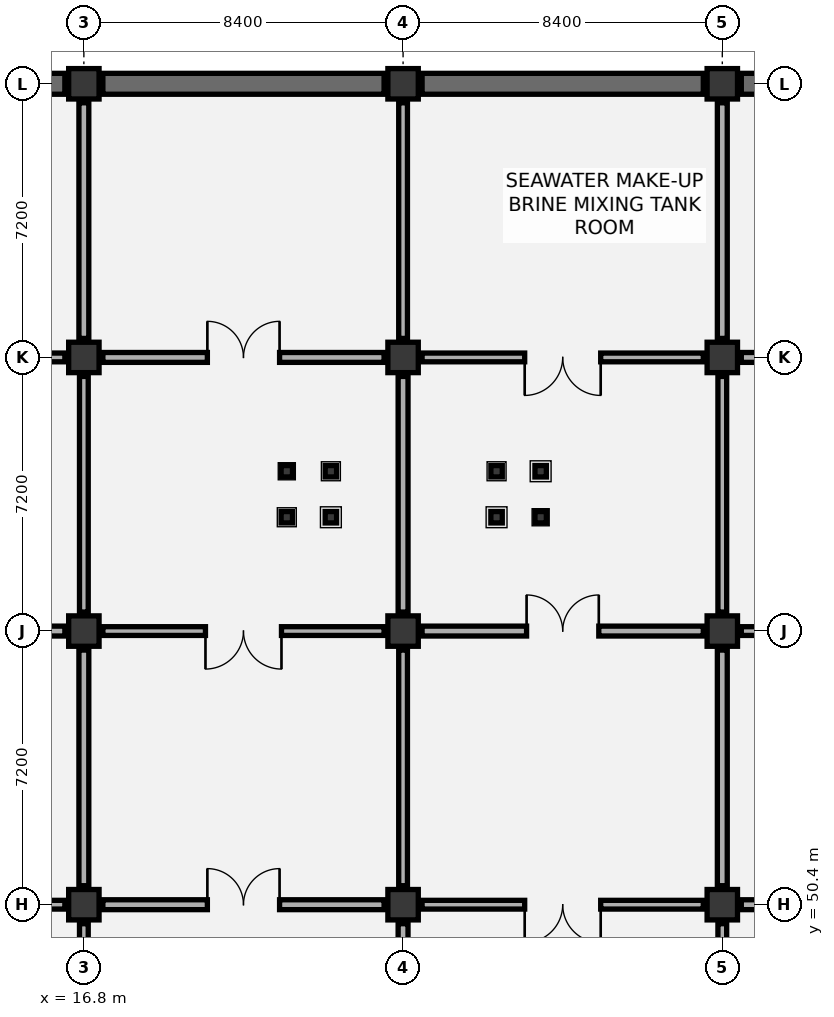
"""IFC4 building model, lengths in metres.
Left out: names, types, materials, properties, quantities, classifications, styles, units other than length and angle.
Written with IfcOpenShell. Run it as: python <this file> out.ifc"""

import sys

from ifc_helpers import new_model, si_unit, direction, frame, frame_2d, origin, origin_2d, place, context, subcontext, project, spatial, rectangle, i_section, extrude, element, fill, save


model = new_model("IFC4")
c1 = context("Model", 3, precision=1e-05, world=origin(), true_north=direction((0.0, 1.0)))
c2 = subcontext(c1, "Body", "Model", "MODEL_VIEW")
j1 = project(units=[si_unit("LENGTHUNIT", "METRE"), si_unit("PLANEANGLEUNIT", "RADIAN")], contexts=[c1])
p1 = place(None, origin())
s1 = spatial("IfcSite", under=j1, at=p1, CompositionType="ELEMENT")
p2 = place(p1, origin())
s2 = spatial("IfcBuilding", under=s1, at=p2, CompositionType="ELEMENT")
p3 = place(p2, frame((0.0, 0.0, -9.6)))
s3 = spatial("IfcBuildingStorey", under=s2, at=p3, CompositionType="ELEMENT", Elevation=-9.6)
for number, where, z_axis, x_axis in (
    (1, (16.8, 50.4, 0.0), (0.0, 0.0, 1.0), (1.0, 0.0, 0.0)),
    (2, (16.8, 57.6, 0.0), (0.0, 0.0, 1.0), (1.0, 0.0, 0.0)),
    (3, (16.8, 64.8, 0.0), (0.0, 0.0, 1.0), (1.0, 0.0, 0.0)),
    (4, (16.8, 72.0, 0.0), (0.0, 0.0, 1.0), (1.0, 0.0, 0.0)),
    (5, (25.2, 50.4, 0.0), (0.0, 0.0, 1.0), (1.0, 0.0, 0.0)),
    (6, (25.2, 57.6, 0.0), (0.0, 0.0, 1.0), (1.0, 0.0, 0.0)),
    (7, (25.2, 64.8, 0.0), (0.0, 0.0, 1.0), (1.0, 0.0, 0.0)),
    (8, (25.2, 72.0, 0.0), (0.0, 0.0, 1.0), (1.0, 0.0, 0.0)),
    (9, (33.6, 50.4, 0.0), (0.0, 0.0, 1.0), (1.0, 0.0, 0.0)),
    (10, (33.6, 57.6, 0.0), (0.0, 0.0, 1.0), (1.0, 0.0, 0.0)),
    (11, (33.6, 64.8, 0.0), (0.0, 0.0, 1.0), (1.0, 0.0, 0.0)),
    (12, (33.6, 72.0, 0.0), (0.0, 0.0, 1.0), (1.0, 0.0, 0.0)),
):
    element("IfcColumn", number, at=place(p3, frame(where, z_axis=z_axis, x_axis=x_axis)), inside=s3, PredefinedType="COLUMN", context=c2, shape_type="SweptSolid", body=[
        extrude(rectangle(XDim=0.8, YDim=0.8, at=origin_2d()), origin(), (0.0, 0.0, 1.0), 4.8),
    ])
for number, where, z_axis, x_axis in (
    (13, (22.14, 60.595, 0.0), (0.0, 0.0, 1.0), (1.0, 0.0, 0.0)),
    (14, (23.3, 60.595, 0.0), (0.0, 0.0, 1.0), (1.0, 0.0, 0.0)),
    (15, (22.14, 61.805, 0.0), (0.0, 0.0, 1.0), (1.0, 0.0, 0.0)),
    (16, (23.3, 61.805, 0.0), (0.0, 0.0, 1.0), (1.0, 0.0, 0.0)),
    (17, (27.66, 60.595, 0.0), (0.0, 0.0, 1.0), (1.0, 0.0, 0.0)),
    (18, (28.82, 60.595, 0.0), (0.0, 0.0, 1.0), (1.0, 0.0, 0.0)),
    (19, (27.66, 61.805, 0.0), (0.0, 0.0, 1.0), (1.0, 0.0, 0.0)),
    (20, (28.82, 61.805, 0.0), (0.0, 0.0, 1.0), (1.0, 0.0, 0.0)),
):
    element("IfcColumn", number, at=place(p3, frame(where, z_axis=z_axis, x_axis=x_axis)), inside=s3, PredefinedType="COLUMN", context=c2, shape_type="SweptSolid", body=[
        extrude(i_section(OverallWidth=0.3, OverallDepth=0.3, WebThickness=0.011, FlangeThickness=0.019, FilletRadius=0.027, at=origin_2d()), origin(), (0.0, 0.0, 1.0), 4.4),
    ])
p4 = place(p3, frame((8.9, 72.0, 0.0), z_axis=(0.0, 0.0, 1.0), x_axis=(1.0, 0.0, 0.0)))
e21 = element("IfcWall", 21, at=p4, inside=s3, PredefinedType="USERDEFINED", context=c2, shape_type="SweptSolid", body=[
    extrude(rectangle(XDim=7.4, YDim=0.55, at=frame_2d((3.7, 0.0))), origin(), (0.0, 0.0, 1.0), 4.4),
])
p5 = place(p3, frame((17.3, 72.0, 0.0), z_axis=(0.0, 0.0, 1.0), x_axis=(1.0, 0.0, 0.0)))
e22 = element("IfcWall", 22, at=p5, inside=s3, PredefinedType="USERDEFINED", context=c2, shape_type="SweptSolid", body=[
    extrude(rectangle(XDim=7.4, YDim=0.55, at=frame_2d((3.7, 0.0))), origin(), (0.0, 0.0, 1.0), 4.4),
])
p6 = place(p3, frame((25.7, 72.0, 0.0), z_axis=(0.0, 0.0, 1.0), x_axis=(1.0, 0.0, 0.0)))
e23 = element("IfcWall", 23, at=p6, inside=s3, PredefinedType="USERDEFINED", context=c2, shape_type="SweptSolid", body=[
    extrude(rectangle(XDim=7.4, YDim=0.55, at=frame_2d((3.7, 0.0))), origin(), (0.0, 0.0, 1.0), 4.4),
])
p7 = place(p3, frame((34.1, 72.0, 0.0), z_axis=(0.0, 0.0, 1.0), x_axis=(1.0, 0.0, 0.0)))
e24 = element("IfcWall", 24, at=p7, inside=s3, PredefinedType="USERDEFINED", context=c2, shape_type="SweptSolid", body=[
    extrude(rectangle(XDim=7.4, YDim=0.55, at=frame_2d((3.7, 0.0))), origin(), (0.0, 0.0, 1.0), 4.4),
])
p8 = place(p3, frame((16.8, 43.7, 0.0), z_axis=(0.0, 0.0, 1.0), x_axis=(0.0, 1.0, 0.0)))
e25 = element("IfcWall", 25, at=p8, inside=s3, PredefinedType="PARTITIONING", context=c2, shape_type="SweptSolid", body=[
    extrude(rectangle(XDim=6.2, YDim=0.23, at=frame_2d((3.1, 0.0))), origin(), (0.0, 0.0, 1.0), 3.595),
])
p9 = place(p8, frame((2.15, 0.0, 0.0)))
e26 = element("IfcOpeningElement", 26, at=p9, cuts=e25, PredefinedType="OPENING", context=c2, shape_type="SweptSolid", body=[
    extrude(rectangle(XDim=1.9, YDim=2.3, at=frame_2d((0.95, 1.15))), frame((0.0, 0.125, 0.0), z_axis=(0.0, -1.0, 0.0), x_axis=(1.0, 0.0, 0.0)), (0.0, 0.0, 1.0), 0.25),
])
p10 = place(p3, frame((8.9, 50.4, 0.0), z_axis=(0.0, 0.0, 1.0), x_axis=(1.0, 0.0, 0.0)))
e27 = element("IfcWall", 27, at=p10, inside=s3, PredefinedType="PARTITIONING", context=c2, shape_type="SweptSolid", body=[
    extrude(rectangle(XDim=7.4, YDim=0.23, at=frame_2d((3.7, 0.0))), origin(), (0.0, 0.0, 1.0), 3.495),
])
p11 = place(p10, frame((2.7, 0.0, 0.0)))
e28 = element("IfcOpeningElement", 28, at=p11, cuts=e27, PredefinedType="OPENING", context=c2, shape_type="SweptSolid", body=[
    extrude(rectangle(XDim=2.0, YDim=2.35, at=frame_2d((1.0, 1.175))), frame((0.0, 0.125, 0.0), z_axis=(0.0, -1.0, 0.0), x_axis=(1.0, 0.0, 0.0)), (0.0, 0.0, 1.0), 0.25),
])
p12 = place(p3, frame((16.8, 50.9, 0.0), z_axis=(0.0, 0.0, 1.0), x_axis=(0.0, 1.0, 0.0)))
e29 = element("IfcWall", 29, at=p12, inside=s3, PredefinedType="PARTITIONING", context=c2, shape_type="SweptSolid", body=[
    extrude(rectangle(XDim=6.2, YDim=0.26, at=frame_2d((3.1, 0.0))), origin(), (0.0, 0.0, 1.0), 3.595),
])
p13 = place(p3, frame((8.9, 57.6, 0.0), z_axis=(0.0, 0.0, 1.0), x_axis=(1.0, 0.0, 0.0)))
e30 = element("IfcWall", 30, at=p13, inside=s3, PredefinedType="PARTITIONING", context=c2, shape_type="SweptSolid", body=[
    extrude(rectangle(XDim=7.4, YDim=0.26, at=frame_2d((3.7, 0.0))), origin(), (0.0, 0.0, 1.0), 3.495),
])
p14 = place(p13, frame((2.75, 0.0, 0.0)))
e31 = element("IfcOpeningElement", 31, at=p14, cuts=e30, PredefinedType="OPENING", context=c2, shape_type="SweptSolid", body=[
    extrude(rectangle(XDim=1.9, YDim=2.3, at=frame_2d((0.95, 1.15))), frame((0.0, 0.14, 0.0), z_axis=(0.0, -1.0, 0.0), x_axis=(1.0, 0.0, 0.0)), (0.0, 0.0, 1.0), 0.28),
])
p15 = place(p3, frame((16.8, 58.1, 0.0), z_axis=(0.0, 0.0, 1.0), x_axis=(0.0, 1.0, 0.0)))
e32 = element("IfcWall", 32, at=p15, inside=s3, PredefinedType="PARTITIONING", context=c2, shape_type="SweptSolid", body=[
    extrude(rectangle(XDim=6.2, YDim=0.23, at=frame_2d((3.1, 0.0))), origin(), (0.0, 0.0, 1.0), 3.595),
])
p16 = place(p3, frame((8.9, 64.8, 0.0), z_axis=(0.0, 0.0, 1.0), x_axis=(1.0, 0.0, 0.0)))
e33 = element("IfcWall", 33, at=p16, inside=s3, PredefinedType="PARTITIONING", context=c2, shape_type="SweptSolid", body=[
    extrude(rectangle(XDim=7.4, YDim=0.23, at=frame_2d((3.7, 0.0))), origin(), (0.0, 0.0, 1.0), 3.495),
])
p17 = place(p16, frame((2.7, 0.0, 0.0)))
e34 = element("IfcOpeningElement", 34, at=p17, cuts=e33, PredefinedType="OPENING", context=c2, shape_type="SweptSolid", body=[
    extrude(rectangle(XDim=2.0, YDim=2.35, at=frame_2d((1.0, 1.175))), frame((0.0, 0.125, 0.0), z_axis=(0.0, -1.0, 0.0), x_axis=(1.0, 0.0, 0.0)), (0.0, 0.0, 1.0), 0.25),
])
p18 = place(p3, frame((16.8, 65.3, 0.0), z_axis=(0.0, 0.0, 1.0), x_axis=(0.0, 1.0, 0.0)))
e35 = element("IfcWall", 35, at=p18, inside=s3, PredefinedType="PARTITIONING", context=c2, shape_type="SweptSolid", body=[
    extrude(rectangle(XDim=6.2, YDim=0.26, at=frame_2d((3.1, 0.0))), origin(), (0.0, 0.0, 1.0), 3.595),
])
p19 = place(p3, frame((25.2, 43.7, 0.0), z_axis=(0.0, 0.0, 1.0), x_axis=(0.0, 1.0, 0.0)))
e36 = element("IfcWall", 36, at=p19, inside=s3, PredefinedType="PARTITIONING", context=c2, shape_type="SweptSolid", body=[
    extrude(rectangle(XDim=6.2, YDim=0.26, at=frame_2d((3.1, 0.0))), origin(), (0.0, 0.0, 1.0), 3.595),
])
p20 = place(p19, frame((2.1, 0.0, 0.0)))
e37 = element("IfcOpeningElement", 37, at=p20, cuts=e36, PredefinedType="OPENING", context=c2, shape_type="SweptSolid", body=[
    extrude(rectangle(XDim=2.0, YDim=2.35, at=frame_2d((1.0, 1.175))), frame((0.0, 0.14, 0.0), z_axis=(0.0, -1.0, 0.0), x_axis=(1.0, 0.0, 0.0)), (0.0, 0.0, 1.0), 0.28),
])
p21 = place(p3, frame((17.3, 50.4, 0.0), z_axis=(0.0, 0.0, 1.0), x_axis=(1.0, 0.0, 0.0)))
e38 = element("IfcWall", 38, at=p21, inside=s3, PredefinedType="PARTITIONING", context=c2, shape_type="SweptSolid", body=[
    extrude(rectangle(XDim=7.4, YDim=0.26, at=frame_2d((3.7, 0.0))), origin(), (0.0, 0.0, 1.0), 3.495),
])
p22 = place(p21, frame((2.75, 0.0, 0.0)))
e39 = element("IfcOpeningElement", 39, at=p22, cuts=e38, PredefinedType="OPENING", context=c2, shape_type="SweptSolid", body=[
    extrude(rectangle(XDim=1.9, YDim=2.3, at=frame_2d((0.95, 1.15))), frame((0.0, 0.14, 0.0), z_axis=(0.0, -1.0, 0.0), x_axis=(1.0, 0.0, 0.0)), (0.0, 0.0, 1.0), 0.28),
])
p23 = place(p3, frame((25.2, 50.9, 0.0), z_axis=(0.0, 0.0, 1.0), x_axis=(0.0, 1.0, 0.0)))
e40 = element("IfcWall", 40, at=p23, inside=s3, PredefinedType="PARTITIONING", context=c2, shape_type="SweptSolid", body=[
    extrude(rectangle(XDim=6.2, YDim=0.23, at=frame_2d((3.1, 0.0))), origin(), (0.0, 0.0, 1.0), 3.595),
])
p24 = place(p3, frame((17.3, 57.6, 0.0), z_axis=(0.0, 0.0, 1.0), x_axis=(1.0, 0.0, 0.0)))
e41 = element("IfcWall", 41, at=p24, inside=s3, PredefinedType="PARTITIONING", context=c2, shape_type="SweptSolid", body=[
    extrude(rectangle(XDim=7.4, YDim=0.23, at=frame_2d((3.7, 0.0))), origin(), (0.0, 0.0, 1.0), 3.495),
])
p25 = place(p24, frame((2.7, 0.0, 0.0)))
e42 = element("IfcOpeningElement", 42, at=p25, cuts=e41, PredefinedType="OPENING", context=c2, shape_type="SweptSolid", body=[
    extrude(rectangle(XDim=2.0, YDim=2.35, at=frame_2d((1.0, 1.175))), frame((0.0, 0.125, 0.0), z_axis=(0.0, -1.0, 0.0), x_axis=(1.0, 0.0, 0.0)), (0.0, 0.0, 1.0), 0.25),
])
p26 = place(p3, frame((25.2, 58.1, 0.0), z_axis=(0.0, 0.0, 1.0), x_axis=(0.0, 1.0, 0.0)))
e43 = element("IfcWall", 43, at=p26, inside=s3, PredefinedType="PARTITIONING", context=c2, shape_type="SweptSolid", body=[
    extrude(rectangle(XDim=6.2, YDim=0.26, at=frame_2d((3.1, 0.0))), origin(), (0.0, 0.0, 1.0), 3.595),
])
p27 = place(p3, frame((17.3, 64.8, 0.0), z_axis=(0.0, 0.0, 1.0), x_axis=(1.0, 0.0, 0.0)))
e44 = element("IfcWall", 44, at=p27, inside=s3, PredefinedType="PARTITIONING", context=c2, shape_type="SweptSolid", body=[
    extrude(rectangle(XDim=7.4, YDim=0.26, at=frame_2d((3.7, 0.0))), origin(), (0.0, 0.0, 1.0), 3.495),
])
p28 = place(p27, frame((2.75, 0.0, 0.0)))
e45 = element("IfcOpeningElement", 45, at=p28, cuts=e44, PredefinedType="OPENING", context=c2, shape_type="SweptSolid", body=[
    extrude(rectangle(XDim=1.9, YDim=2.3, at=frame_2d((0.95, 1.15))), frame((0.0, 0.14, 0.0), z_axis=(0.0, -1.0, 0.0), x_axis=(1.0, 0.0, 0.0)), (0.0, 0.0, 1.0), 0.28),
])
for number, where, z_axis, x_axis in (
    (46, (25.2, 65.3, 0.0), (0.0, 0.0, 1.0), (0.0, 1.0, 0.0)),
    (47, (33.6, 43.7, 0.0), (0.0, 0.0, 1.0), (0.0, 1.0, 0.0)),
):
    element("IfcWall", number, at=place(p3, frame(where, z_axis=z_axis, x_axis=x_axis)), inside=s3, PredefinedType="PARTITIONING", context=c2, shape_type="SweptSolid", body=[
        extrude(rectangle(XDim=6.2, YDim=0.23, at=frame_2d((3.1, 0.0))), origin(), (0.0, 0.0, 1.0), 3.595),
    ])
p29 = place(p3, frame((25.7, 50.4, 0.0), z_axis=(0.0, 0.0, 1.0), x_axis=(1.0, 0.0, 0.0)))
e48 = element("IfcWall", 48, at=p29, inside=s3, PredefinedType="PARTITIONING", context=c2, shape_type="SweptSolid", body=[
    extrude(rectangle(XDim=7.4, YDim=0.23, at=frame_2d((3.7, 0.0))), origin(), (0.0, 0.0, 1.0), 3.495),
])
p30 = place(p29, frame((2.7, 0.0, 0.0)))
e49 = element("IfcOpeningElement", 49, at=p30, cuts=e48, PredefinedType="OPENING", context=c2, shape_type="SweptSolid", body=[
    extrude(rectangle(XDim=2.0, YDim=2.35, at=frame_2d((1.0, 1.175))), frame((0.0, 0.125, 0.0), z_axis=(0.0, -1.0, 0.0), x_axis=(1.0, 0.0, 0.0)), (0.0, 0.0, 1.0), 0.25),
])
p31 = place(p3, frame((33.6, 50.9, 0.0), z_axis=(0.0, 0.0, 1.0), x_axis=(0.0, 1.0, 0.0)))
e50 = element("IfcWall", 50, at=p31, inside=s3, PredefinedType="PARTITIONING", context=c2, shape_type="SweptSolid", body=[
    extrude(rectangle(XDim=6.2, YDim=0.26, at=frame_2d((3.1, 0.0))), origin(), (0.0, 0.0, 1.0), 3.595),
])
p32 = place(p3, frame((25.7, 57.6, 0.0), z_axis=(0.0, 0.0, 1.0), x_axis=(1.0, 0.0, 0.0)))
e51 = element("IfcWall", 51, at=p32, inside=s3, PredefinedType="PARTITIONING", context=c2, shape_type="SweptSolid", body=[
    extrude(rectangle(XDim=7.4, YDim=0.26, at=frame_2d((3.7, 0.0))), origin(), (0.0, 0.0, 1.0), 3.495),
])
p33 = place(p32, frame((2.75, 0.0, 0.0)))
e52 = element("IfcOpeningElement", 52, at=p33, cuts=e51, PredefinedType="OPENING", context=c2, shape_type="SweptSolid", body=[
    extrude(rectangle(XDim=1.9, YDim=2.3, at=frame_2d((0.95, 1.15))), frame((0.0, 0.14, 0.0), z_axis=(0.0, -1.0, 0.0), x_axis=(1.0, 0.0, 0.0)), (0.0, 0.0, 1.0), 0.28),
])
p34 = place(p3, frame((33.6, 58.1, 0.0), z_axis=(0.0, 0.0, 1.0), x_axis=(0.0, 1.0, 0.0)))
e53 = element("IfcWall", 53, at=p34, inside=s3, PredefinedType="PARTITIONING", context=c2, shape_type="SweptSolid", body=[
    extrude(rectangle(XDim=6.2, YDim=0.23, at=frame_2d((3.1, 0.0))), origin(), (0.0, 0.0, 1.0), 3.595),
])
p35 = place(p3, frame((25.7, 64.8, 0.0), z_axis=(0.0, 0.0, 1.0), x_axis=(1.0, 0.0, 0.0)))
e54 = element("IfcWall", 54, at=p35, inside=s3, PredefinedType="PARTITIONING", context=c2, shape_type="SweptSolid", body=[
    extrude(rectangle(XDim=7.4, YDim=0.23, at=frame_2d((3.7, 0.0))), origin(), (0.0, 0.0, 1.0), 3.495),
])
p36 = place(p35, frame((2.7, 0.0, 0.0)))
e55 = element("IfcOpeningElement", 55, at=p36, cuts=e54, PredefinedType="OPENING", context=c2, shape_type="SweptSolid", body=[
    extrude(rectangle(XDim=2.0, YDim=2.35, at=frame_2d((1.0, 1.175))), frame((0.0, 0.125, 0.0), z_axis=(0.0, -1.0, 0.0), x_axis=(1.0, 0.0, 0.0)), (0.0, 0.0, 1.0), 0.25),
])
p37 = place(p3, frame((33.6, 65.3, 0.0), z_axis=(0.0, 0.0, 1.0), x_axis=(0.0, 1.0, 0.0)))
e56 = element("IfcWall", 56, at=p37, inside=s3, PredefinedType="PARTITIONING", context=c2, shape_type="SweptSolid", body=[
    extrude(rectangle(XDim=6.2, YDim=0.26, at=frame_2d((3.1, 0.0))), origin(), (0.0, 0.0, 1.0), 3.595),
])
p38 = place(p3, frame((34.1, 50.4, 0.0), z_axis=(0.0, 0.0, 1.0), x_axis=(1.0, 0.0, 0.0)))
e57 = element("IfcWall", 57, at=p38, inside=s3, PredefinedType="PARTITIONING", context=c2, shape_type="SweptSolid", body=[
    extrude(rectangle(XDim=7.4, YDim=0.26, at=frame_2d((3.7, 0.0))), origin(), (0.0, 0.0, 1.0), 3.495),
])
p39 = place(p3, frame((34.1, 57.6, 0.0), z_axis=(0.0, 0.0, 1.0), x_axis=(1.0, 0.0, 0.0)))
e58 = element("IfcWall", 58, at=p39, inside=s3, PredefinedType="PARTITIONING", context=c2, shape_type="SweptSolid", body=[
    extrude(rectangle(XDim=7.4, YDim=0.23, at=frame_2d((3.7, 0.0))), origin(), (0.0, 0.0, 1.0), 3.495),
])
p40 = place(p39, frame((2.75, 0.0, 0.0)))
e59 = element("IfcOpeningElement", 59, at=p40, cuts=e58, PredefinedType="OPENING", context=c2, shape_type="SweptSolid", body=[
    extrude(rectangle(XDim=1.9, YDim=2.3, at=frame_2d((0.95, 1.15))), frame((0.0, 0.125, 0.0), z_axis=(0.0, -1.0, 0.0), x_axis=(1.0, 0.0, 0.0)), (0.0, 0.0, 1.0), 0.25),
])
p41 = place(p3, frame((34.1, 64.8, 0.0), z_axis=(0.0, 0.0, 1.0), x_axis=(1.0, 0.0, 0.0)))
e60 = element("IfcWall", 60, at=p41, inside=s3, PredefinedType="PARTITIONING", context=c2, shape_type="SweptSolid", body=[
    extrude(rectangle(XDim=7.4, YDim=0.26, at=frame_2d((3.7, 0.0))), origin(), (0.0, 0.0, 1.0), 3.495),
])
p42 = place(p41, frame((2.7, 0.0, 0.0)))
e61 = element("IfcOpeningElement", 61, at=p42, cuts=e60, PredefinedType="OPENING", context=c2, shape_type="SweptSolid", body=[
    extrude(rectangle(XDim=2.0, YDim=2.35, at=frame_2d((1.0, 1.175))), frame((0.0, 0.14, 0.0), z_axis=(0.0, -1.0, 0.0), x_axis=(1.0, 0.0, 0.0)), (0.0, 0.0, 1.0), 0.28),
])
p43 = place(p22, origin())
e62 = element("IfcDoor", 62, at=p43, inside=s3, OperationType="DOUBLE_DOOR_SINGLE_SWING", PredefinedType="DOOR", context=c2, shape_type="SweptSolid", body=[
    extrude(rectangle(XDim=1.9, YDim=2.3, at=frame_2d((0.95, 1.15))), frame((0.0, 0.025, 0.0), z_axis=(0.0, -1.0, 0.0), x_axis=(1.0, 0.0, 0.0)), (0.0, 0.0, 1.0), 0.05),
])
fill(e39, e62)
p44 = place(p25, frame((2.0, 0.0, 0.0), z_axis=(0.0, 0.0, 1.0), x_axis=(-1.0, 0.0, 0.0)))
e63 = element("IfcDoor", 63, at=p44, inside=s3, OperationType="DOUBLE_DOOR_SINGLE_SWING", PredefinedType="DOOR", context=c2, shape_type="SweptSolid", body=[
    extrude(rectangle(XDim=2.0, YDim=2.35, at=frame_2d((1.0, 1.175))), frame((0.0, 0.025, 0.0), z_axis=(0.0, -1.0, 0.0), x_axis=(1.0, 0.0, 0.0)), (0.0, 0.0, 1.0), 0.05),
])
fill(e42, e63)
p45 = place(p28, origin())
e64 = element("IfcDoor", 64, at=p45, inside=s3, OperationType="DOUBLE_DOOR_SINGLE_SWING", PredefinedType="DOOR", context=c2, shape_type="SweptSolid", body=[
    extrude(rectangle(XDim=1.9, YDim=2.3, at=frame_2d((0.95, 1.15))), frame((0.0, 0.025, 0.0), z_axis=(0.0, -1.0, 0.0), x_axis=(1.0, 0.0, 0.0)), (0.0, 0.0, 1.0), 0.05),
])
fill(e45, e64)
p46 = place(p30, frame((2.0, 0.0, 0.0), z_axis=(0.0, 0.0, 1.0), x_axis=(-1.0, 0.0, 0.0)))
e65 = element("IfcDoor", 65, at=p46, inside=s3, OperationType="DOUBLE_DOOR_SINGLE_SWING", PredefinedType="DOOR", context=c2, shape_type="SweptSolid", body=[
    extrude(rectangle(XDim=2.0, YDim=2.35, at=frame_2d((1.0, 1.175))), frame((0.0, 0.025, 0.0), z_axis=(0.0, -1.0, 0.0), x_axis=(1.0, 0.0, 0.0)), (0.0, 0.0, 1.0), 0.05),
])
fill(e49, e65)
p47 = place(p33, origin())
e66 = element("IfcDoor", 66, at=p47, inside=s3, OperationType="DOUBLE_DOOR_SINGLE_SWING", PredefinedType="DOOR", context=c2, shape_type="SweptSolid", body=[
    extrude(rectangle(XDim=1.9, YDim=2.3, at=frame_2d((0.95, 1.15))), frame((0.0, 0.025, 0.0), z_axis=(0.0, -1.0, 0.0), x_axis=(1.0, 0.0, 0.0)), (0.0, 0.0, 1.0), 0.05),
])
fill(e52, e66)
p48 = place(p36, frame((2.0, 0.0, 0.0), z_axis=(0.0, 0.0, 1.0), x_axis=(-1.0, 0.0, 0.0)))
e67 = element("IfcDoor", 67, at=p48, inside=s3, OperationType="DOUBLE_DOOR_SINGLE_SWING", PredefinedType="DOOR", context=c2, shape_type="SweptSolid", body=[
    extrude(rectangle(XDim=2.0, YDim=2.35, at=frame_2d((1.0, 1.175))), frame((0.0, 0.025, 0.0), z_axis=(0.0, -1.0, 0.0), x_axis=(1.0, 0.0, 0.0)), (0.0, 0.0, 1.0), 0.05),
])
fill(e55, e67)
save(model, sys.argv[1])
